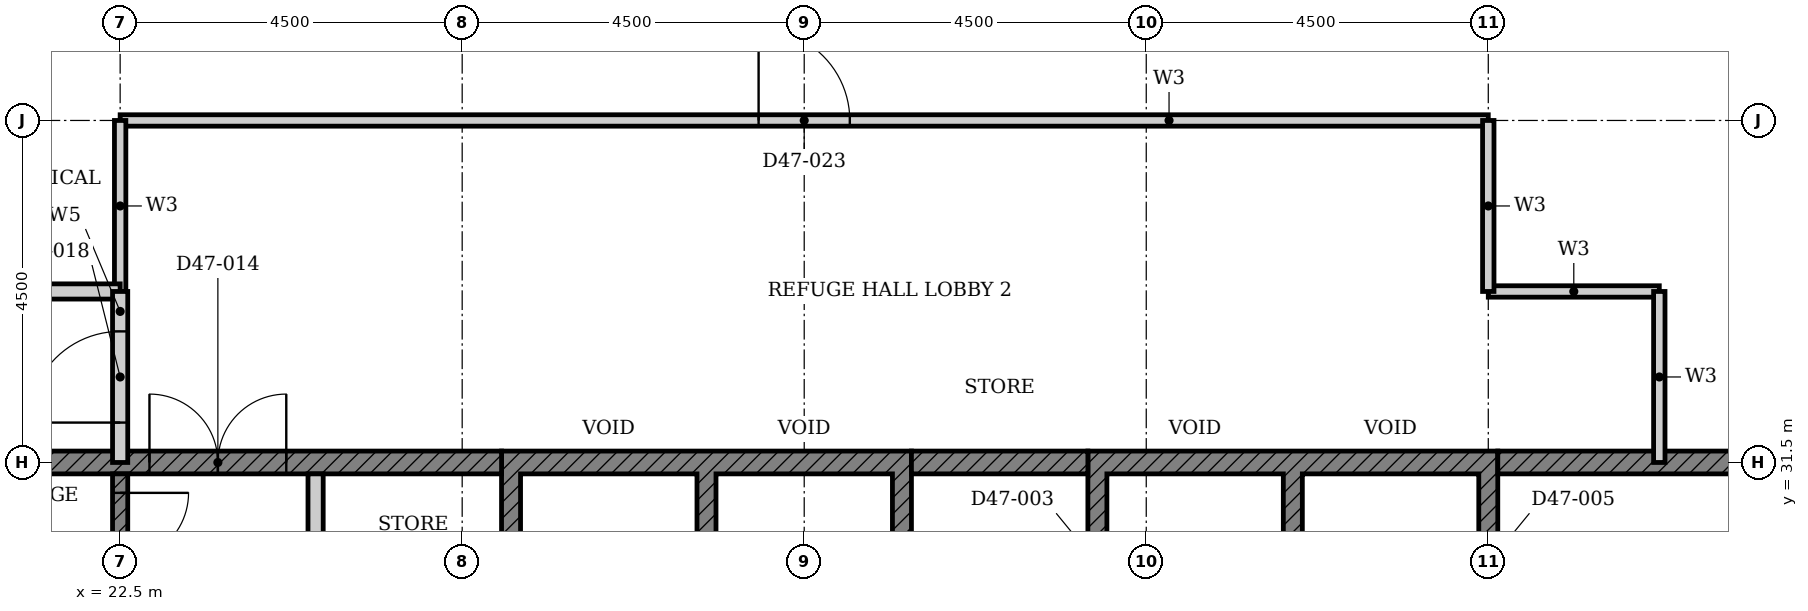
"""IFC4 building model, lengths in metres.
Left out: names, types, materials, properties, quantities, classifications, styles, units other than length and angle.
Written with IfcOpenShell. Run it as: python <this file> out.ifc"""

import sys

from ifc_helpers import new_model, si_unit, direction, frame, frame_2d, origin, place, context, subcontext, project, spatial, polyline, rectangle, outline, extrude, element, fill, save


model = new_model("IFC4")
c1 = context("Model", 3, precision=1e-05, world=origin(), true_north=direction((0.0, 1.0)))
c2 = subcontext(c1, "Body", "Model", "MODEL_VIEW")
j1 = project(units=[si_unit("LENGTHUNIT", "METRE"), si_unit("PLANEANGLEUNIT", "RADIAN")], contexts=[c1])
p1 = place(None, origin())
s1 = spatial("IfcSite", under=j1, at=p1, CompositionType="ELEMENT")
p2 = place(p1, origin())
s2 = spatial("IfcBuilding", under=s1, at=p2, CompositionType="ELEMENT")
p3 = place(p2, frame((0.0, 0.0, 187.6)))
s3 = spatial("IfcBuildingStorey", under=s2, at=p3, CompositionType="ELEMENT", Elevation=187.6)
p4 = place(p3, origin())
e1 = element("IfcWall", 1, at=p4, inside=s3, PredefinedType="SHEAR", context=c2, shape_type="SweptSolid", body=[
    extrude(outline(polyline([(27.518, 28.725), (27.768, 28.725), (27.768, 31.35), (30.089, 31.35), (30.089, 28.725), (30.339, 28.725), (30.339, 31.35), (32.661, 31.35), (32.661, 28.725), (32.911, 28.725), (32.911, 31.65), (27.518, 31.65), (27.518, 28.725)])), origin(), (0.0, 0.0, 1.0), 4.5),
])
p5 = place(p3, origin())
e2 = element("IfcWall", 2, at=p5, inside=s3, PredefinedType="SHEAR", context=c2, shape_type="SweptSolid", body=[
    extrude(outline(polyline([(35.232, 28.725), (35.482, 28.725), (35.482, 31.35), (37.803, 31.35), (37.803, 28.725), (38.053, 28.725), (38.053, 31.35), (40.375, 31.35), (40.375, 28.725), (40.625, 28.725), (40.625, 31.65), (35.232, 31.65), (35.232, 28.725)])), origin(), (0.0, 0.0, 1.0), 4.5),
])
p6 = place(p3, frame((18.15, 31.5, 0.0), z_axis=(0.0, 0.0, 1.0), x_axis=(1.0, 0.0, 0.0)))
e3 = element("IfcWall", 3, at=p6, inside=s3, PredefinedType="SHEAR", context=c2, shape_type="SweptSolid", body=[
    extrude(rectangle(XDim=9.368, YDim=0.3, at=frame_2d((4.684, 0.0))), origin(), (0.0, 0.0, 1.0), 4.5),
])
p7 = place(p6, frame((4.736, 0.0, 0.0)))
e4 = element("IfcOpeningElement", 4, at=p7, cuts=e3, PredefinedType="OPENING", context=c2, shape_type="SweptSolid", body=[
    extrude(rectangle(XDim=1.8, YDim=2.1, at=frame_2d((0.9, 1.05))), frame((0.0, 0.16, 0.0), z_axis=(0.0, -1.0, 0.0), x_axis=(1.0, 0.0, 0.0)), (0.0, 0.0, 1.0), 0.32),
])
p8 = place(p3, frame((32.911, 31.5, 0.0), z_axis=(0.0, 0.0, 1.0), x_axis=(1.0, 0.0, 0.0)))
e5 = element("IfcWall", 5, at=p8, inside=s3, PredefinedType="SHEAR", context=c2, shape_type="SweptSolid", body=[
    extrude(rectangle(XDim=2.322, YDim=0.3, at=frame_2d((1.161, 0.0))), origin(), (0.0, 0.0, 1.0), 4.5),
])
p9 = place(p3, frame((40.625, 31.5, 0.0), z_axis=(0.0, 0.0, 1.0), x_axis=(1.0, 0.0, 0.0)))
e6 = element("IfcWall", 6, at=p9, inside=s3, PredefinedType="SHEAR", context=c2, shape_type="SweptSolid", body=[
    extrude(rectangle(XDim=4.225, YDim=0.3, at=frame_2d((2.113, 0.0))), origin(), (0.0, 0.0, 1.0), 4.5),
])
p10 = place(p3, frame((25.072, 28.725, 0.0), z_axis=(0.0, 0.0, 1.0), x_axis=(0.0, 1.0, 0.0)))
e7 = element("IfcWall", 7, at=p10, inside=s3, PredefinedType="PARTITIONING", context=c2, shape_type="SweptSolid", body=[
    extrude(rectangle(XDim=2.625, YDim=0.2, at=frame_2d((1.312, 0.0))), origin(), (0.0, 0.0, 1.0), 4.5),
])
p11 = place(p3, frame((22.5, 31.35, 0.0), z_axis=(0.0, 0.0, 1.0), x_axis=(0.0, -1.0, 0.0)))
e8 = element("IfcWall", 8, at=p11, inside=s3, PredefinedType="SHEAR", context=c2, shape_type="SweptSolid", body=[
    extrude(rectangle(XDim=5.825, YDim=0.2, at=frame_2d((2.913, 0.0))), origin(), (0.0, 0.0, 1.0), 4.5),
])
p12 = place(p11, frame((0.25, 0.0, 0.0)))
e9 = element("IfcOpeningElement", 9, at=p12, cuts=e8, PredefinedType="OPENING", context=c2, shape_type="SweptSolid", body=[
    extrude(rectangle(XDim=1.8, YDim=2.1, at=frame_2d((0.9, 1.05))), frame((0.0, 0.11, 0.0), z_axis=(0.0, -1.0, 0.0), x_axis=(1.0, 0.0, 0.0)), (0.0, 0.0, 1.0), 0.22),
])
p13 = place(p3, frame((40.5, 33.75, 0.0), z_axis=(0.0, 0.0, 1.0), x_axis=(1.0, 0.0, 0.0)))
e10 = element("IfcWall", 10, at=p13, inside=s3, PredefinedType="PARTITIONING", context=c2, shape_type="SweptSolid", body=[
    extrude(rectangle(XDim=2.25, YDim=0.15, at=frame_2d((1.125, 0.0))), origin(), (0.0, 0.0, 1.0), 4.5),
])
p14 = place(p3, frame((22.5, 36.0, 0.0), z_axis=(0.0, 0.0, 1.0), x_axis=(1.0, 0.0, 0.0)))
e11 = element("IfcWall", 11, at=p14, inside=s3, PredefinedType="PARTITIONING", context=c2, shape_type="SweptSolid", body=[
    extrude(rectangle(XDim=18.0, YDim=0.15, at=frame_2d((9.0, 0.0))), origin(), (0.0, 0.0, 1.0), 4.5),
])
p15 = place(p14, frame((8.4, 0.0, 0.0)))
e12 = element("IfcOpeningElement", 12, at=p15, cuts=e11, PredefinedType="OPENING", context=c2, shape_type="SweptSolid", body=[
    extrude(rectangle(XDim=1.2, YDim=2.1, at=frame_2d((0.6, 1.05))), frame((0.0, 0.085, 0.0), z_axis=(0.0, -1.0, 0.0), x_axis=(1.0, 0.0, 0.0)), (0.0, 0.0, 1.0), 0.17),
])
for number, where, z_axis, x_axis in (
    (13, (22.5, 33.75, 0.0), (0.0, 0.0, 1.0), (0.0, 1.0, 0.0)),
    (14, (40.5, 33.75, 0.0), (0.0, 0.0, 1.0), (0.0, 1.0, 0.0)),
    (15, (42.75, 31.5, 0.0), (0.0, 0.0, 1.0), (0.0, 1.0, 0.0)),
):
    element("IfcWall", number, at=place(p3, frame(where, z_axis=z_axis, x_axis=x_axis)), inside=s3, PredefinedType="PARTITIONING", context=c2, shape_type="SweptSolid", body=[
        extrude(rectangle(XDim=2.25, YDim=0.15, at=frame_2d((1.125, 0.0))), origin(), (0.0, 0.0, 1.0), 4.5),
    ])
p16 = place(p3, frame((20.25, 33.75, 0.0), z_axis=(0.0, 0.0, 1.0), x_axis=(1.0, 0.0, 0.0)))
e16 = element("IfcWall", 16, at=p16, inside=s3, PredefinedType="PARTITIONING", context=c2, shape_type="SweptSolid", body=[
    extrude(rectangle(XDim=2.25, YDim=0.2, at=frame_2d((1.125, 0.0))), origin(), (0.0, 0.0, 1.0), 4.5),
])
p17 = place(p3, frame((22.5, 31.5, 0.0), z_axis=(0.0, 0.0, 1.0), x_axis=(0.0, 1.0, 0.0)))
e17 = element("IfcWall", 17, at=p17, inside=s3, PredefinedType="PARTITIONING", context=c2, shape_type="SweptSolid", body=[
    extrude(rectangle(XDim=2.25, YDim=0.2, at=frame_2d((1.125, 0.0))), origin(), (0.0, 0.0, 1.0), 4.5),
])
p18 = place(p17, frame((0.525, 0.0, 0.0)))
e18 = element("IfcOpeningElement", 18, at=p18, cuts=e17, PredefinedType="OPENING", context=c2, shape_type="SweptSolid", body=[
    extrude(rectangle(XDim=1.2, YDim=2.1, at=frame_2d((0.6, 1.05))), frame((0.0, 0.11, 0.0), z_axis=(0.0, -1.0, 0.0), x_axis=(1.0, 0.0, 0.0)), (0.0, 0.0, 1.0), 0.22),
])
p19 = place(p12, origin())
e19 = element("IfcDoor", 19, at=p19, inside=s3, OperationType="DOUBLE_DOOR_SINGLE_SWING", PredefinedType="DOOR", context=c2, shape_type="SweptSolid", body=[
    extrude(rectangle(XDim=1.8, YDim=2.1, at=frame_2d((0.9, 1.05))), frame((0.0, 0.025, 0.0), z_axis=(0.0, -1.0, 0.0), x_axis=(1.0, 0.0, 0.0)), (0.0, 0.0, 1.0), 0.05),
])
fill(e9, e19)
p20 = place(p7, origin())
e20 = element("IfcDoor", 20, at=p20, inside=s3, OperationType="DOUBLE_DOOR_SINGLE_SWING", PredefinedType="DOOR", context=c2, shape_type="SweptSolid", body=[
    extrude(rectangle(XDim=1.8, YDim=2.1, at=frame_2d((0.9, 1.05))), frame((0.0, 0.025, 0.0), z_axis=(0.0, -1.0, 0.0), x_axis=(1.0, 0.0, 0.0)), (0.0, 0.0, 1.0), 0.05),
])
fill(e4, e20)
p21 = place(p18, origin())
e21 = element("IfcDoor", 21, at=p21, inside=s3, OperationType="SINGLE_SWING_RIGHT", PredefinedType="DOOR", context=c2, shape_type="SweptSolid", body=[
    extrude(rectangle(XDim=1.2, YDim=2.1, at=frame_2d((0.6, 1.05))), frame((0.0, 0.025, 0.0), z_axis=(0.0, -1.0, 0.0), x_axis=(1.0, 0.0, 0.0)), (0.0, 0.0, 1.0), 0.05),
])
fill(e18, e21)
p22 = place(p15, origin())
e22 = element("IfcDoor", 22, at=p22, inside=s3, OperationType="SINGLE_SWING_LEFT", PredefinedType="DOOR", context=c2, shape_type="SweptSolid", body=[
    extrude(rectangle(XDim=1.2, YDim=2.1, at=frame_2d((0.6, 1.05))), frame((0.0, 0.025, 0.0), z_axis=(0.0, -1.0, 0.0), x_axis=(1.0, 0.0, 0.0)), (0.0, 0.0, 1.0), 0.05),
])
fill(e12, e22)
save(model, sys.argv[1])
